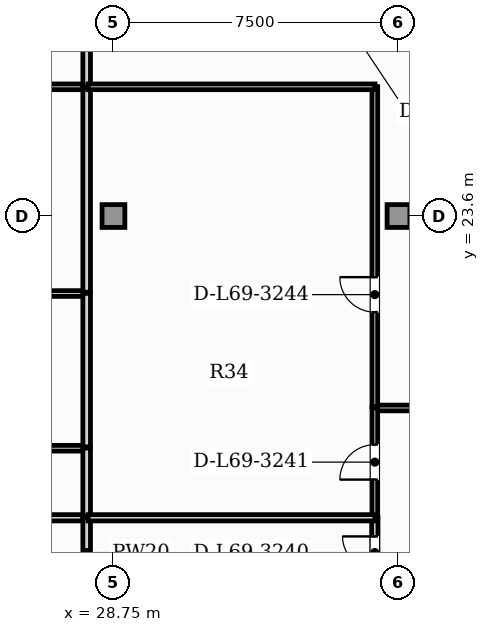
"""IFC4 building model, lengths in metres.
Left out: names, types, materials, properties, quantities, classifications, styles, units other than length and angle.
Written with IfcOpenShell. Run it as: python <this file> out.ifc"""

import sys

from ifc_helpers import new_model, si_unit, direction, frame, frame_2d, origin, origin_2d, place, context, subcontext, project, spatial, rectangle, extrude, element, fill, save


model = new_model("IFC4")
c1 = context("Model", 3, precision=1e-05, world=origin(), true_north=direction((0.0, 1.0)))
c2 = subcontext(c1, "Body", "Model", "MODEL_VIEW")
j1 = project(units=[si_unit("LENGTHUNIT", "METRE"), si_unit("PLANEANGLEUNIT", "RADIAN")], contexts=[c1])
p1 = place(None, origin())
s1 = spatial("IfcSite", under=j1, at=p1, CompositionType="ELEMENT")
p2 = place(p1, origin())
s2 = spatial("IfcBuilding", under=s1, at=p2, CompositionType="ELEMENT")
p3 = place(p2, frame((0.0, 0.0, 281.05)))
s3 = spatial("IfcBuildingStorey", under=s2, at=p3, CompositionType="ELEMENT", Elevation=281.05)
for number, where, z_axis, x_axis in (
    (1, (28.75, 23.6, 0.0), (0.0, 0.0, 1.0), (1.0, 0.0, 0.0)),
    (2, (36.25, 23.6, 0.0), (0.0, 0.0, 1.0), (1.0, 0.0, 0.0)),
):
    element("IfcColumn", number, at=place(p3, frame(where, z_axis=z_axis, x_axis=x_axis)), inside=s3, PredefinedType="COLUMN", context=c2, shape_type="SweptSolid", body=[
        extrude(rectangle(XDim=0.6, YDim=0.6, at=origin_2d()), origin(), (0.0, 0.0, 1.0), 3.85),
    ])
p4 = place(p3, frame((21.079, 27.0, 0.0), z_axis=(0.0, 0.0, 1.0), x_axis=(1.0, 0.0, 0.0)))
e3 = element("IfcWall", 3, at=p4, inside=s3, PredefinedType="PARTITIONING", context=c2, shape_type="SweptSolid", body=[
    extrude(rectangle(XDim=6.971, YDim=0.15, at=frame_2d((3.485, 0.0))), origin(), (0.0, 0.0, 1.0), 3.65),
])
p5 = place(p4, frame((3.025, 0.0, 0.0)))
e4 = element("IfcOpeningElement", 4, at=p5, cuts=e3, PredefinedType="OPENING", context=c2, shape_type="SweptSolid", body=[
    extrude(rectangle(XDim=0.92, YDim=2.1, at=frame_2d((0.46, 1.05))), frame((0.0, 0.085, 0.0), z_axis=(0.0, -1.0, 0.0), x_axis=(1.0, 0.0, 0.0)), (0.0, 0.0, 1.0), 0.17),
])
p6 = place(p3, frame((28.045, 26.995, 0.0), z_axis=(0.0, 0.0, 1.0), x_axis=(0.0, 1.0, 0.0)))
e5 = element("IfcWall", 5, at=p6, inside=s3, PredefinedType="PARTITIONING", context=c2, shape_type="SweptSolid", body=[
    extrude(rectangle(XDim=1.51, YDim=0.2, at=frame_2d((0.755, 0.0))), origin(), (0.0, 0.0, 1.0), 3.65),
])
p7 = place(p3, frame((21.079, 15.66, 0.0), z_axis=(0.0, 0.0, 1.0), x_axis=(1.0, 0.0, 0.0)))
e6 = element("IfcWall", 6, at=p7, inside=s3, PredefinedType="PLUMBINGWALL", context=c2, shape_type="SweptSolid", body=[
    extrude(rectangle(XDim=6.971, YDim=0.165, at=frame_2d((3.485, 0.0))), origin(), (0.0, 0.0, 1.0), 3.65),
])
p8 = place(p3, frame((28.045, 13.825, 0.0), z_axis=(0.0, 0.0, 1.0), x_axis=(0.0, 1.0, 0.0)))
e7 = element("IfcWall", 7, at=p8, inside=s3, PredefinedType="PARTITIONING", context=c2, shape_type="SweptSolid", body=[
    extrude(rectangle(XDim=1.84, YDim=0.2, at=frame_2d((0.92, 0.0))), origin(), (0.0, 0.0, 1.0), 3.65),
])
p9 = place(p3, frame((21.079, 17.49, 0.0), z_axis=(0.0, 0.0, 1.0), x_axis=(1.0, 0.0, 0.0)))
e8 = element("IfcWall", 8, at=p9, inside=s3, PredefinedType="PARTITIONING", context=c2, shape_type="SweptSolid", body=[
    extrude(rectangle(XDim=6.971, YDim=0.15, at=frame_2d((3.485, 0.0))), origin(), (0.0, 0.0, 1.0), 3.65),
])
p10 = place(p3, frame((28.045, 15.695, 0.0), z_axis=(0.0, 0.0, 1.0), x_axis=(0.0, 1.0, 0.0)))
e9 = element("IfcWall", 9, at=p10, inside=s3, PredefinedType="PARTITIONING", context=c2, shape_type="SweptSolid", body=[
    extrude(rectangle(XDim=1.8, YDim=0.2, at=frame_2d((0.9, 0.0))), origin(), (0.0, 0.0, 1.0), 3.65),
])
p11 = place(p3, frame((21.079, 21.561, 0.0), z_axis=(0.0, 0.0, 1.0), x_axis=(1.0, 0.0, 0.0)))
e10 = element("IfcWall", 10, at=p11, inside=s3, PredefinedType="PARTITIONING", context=c2, shape_type="SweptSolid", body=[
    extrude(rectangle(XDim=6.971, YDim=0.15, at=frame_2d((3.485, 0.0))), origin(), (0.0, 0.0, 1.0), 3.65),
])
p12 = place(p3, frame((28.045, 17.525, 0.0), z_axis=(0.0, 0.0, 1.0), x_axis=(0.0, 1.0, 0.0)))
e11 = element("IfcWall", 11, at=p12, inside=s3, PredefinedType="PARTITIONING", context=c2, shape_type="SweptSolid", body=[
    extrude(rectangle(XDim=4.041, YDim=0.2, at=frame_2d((2.021, 0.0))), origin(), (0.0, 0.0, 1.0), 3.65),
])
p13 = place(p3, frame((28.045, 21.596, 0.0), z_axis=(0.0, 0.0, 1.0), x_axis=(0.0, 1.0, 0.0)))
e12 = element("IfcWall", 12, at=p13, inside=s3, PredefinedType="PARTITIONING", context=c2, shape_type="SweptSolid", body=[
    extrude(rectangle(XDim=5.369, YDim=0.2, at=frame_2d((2.685, 0.0))), origin(), (0.0, 0.0, 1.0), 3.65),
])
p14 = place(p3, frame((35.622, 18.55, 0.0), z_axis=(0.0, 0.0, 1.0), x_axis=(1.0, 0.0, 0.0)))
e13 = element("IfcWall", 13, at=p14, inside=s3, PredefinedType="PARTITIONING", context=c2, shape_type="SweptSolid", body=[
    extrude(rectangle(XDim=4.99, YDim=0.15, at=frame_2d((2.495, 0.0))), origin(), (0.0, 0.0, 1.0), 3.65),
])
p15 = place(p14, frame((2.035, 0.0, 0.0)))
e14 = element("IfcOpeningElement", 14, at=p15, cuts=e13, PredefinedType="OPENING", context=c2, shape_type="SweptSolid", body=[
    extrude(rectangle(XDim=0.92, YDim=2.1, at=frame_2d((0.46, 1.05))), frame((0.0, 0.085, 0.0), z_axis=(0.0, -1.0, 0.0), x_axis=(1.0, 0.0, 0.0)), (0.0, 0.0, 1.0), 0.17),
])
p16 = place(p3, frame((35.627, 13.825, 0.0), z_axis=(0.0, 0.0, 1.0), x_axis=(0.0, 1.0, 0.0)))
e15 = element("IfcWall", 15, at=p16, inside=s3, PredefinedType="PLUMBINGWALL", context=c2, shape_type="SweptSolid", body=[
    extrude(rectangle(XDim=1.84, YDim=0.165, at=frame_2d((0.92, 0.0))), origin(), (0.0, 0.0, 1.0), 3.65),
])
p17 = place(p16, frame((0.495, 0.0, 0.0)))
e16 = element("IfcOpeningElement", 16, at=p17, cuts=e15, PredefinedType="OPENING", context=c2, shape_type="SweptSolid", body=[
    extrude(rectangle(XDim=0.85, YDim=2.1, at=frame_2d((0.425, 1.05))), frame((0.0, 0.093, 0.0), z_axis=(0.0, -1.0, 0.0), x_axis=(1.0, 0.0, 0.0)), (0.0, 0.0, 1.0), 0.185),
])
p18 = place(p3, frame((35.627, 15.695, 0.0), z_axis=(0.0, 0.0, 1.0), x_axis=(0.0, 1.0, 0.0)))
e17 = element("IfcWall", 17, at=p18, inside=s3, PredefinedType="PARTITIONING", context=c2, shape_type="SweptSolid", body=[
    extrude(rectangle(XDim=2.859, YDim=0.15, at=frame_2d((1.43, 0.0))), origin(), (0.0, 0.0, 1.0), 3.65),
])
p19 = place(p18, frame((0.97, 0.0, 0.0)))
e18 = element("IfcOpeningElement", 18, at=p19, cuts=e17, PredefinedType="OPENING", context=c2, shape_type="SweptSolid", body=[
    extrude(rectangle(XDim=0.92, YDim=2.1, at=frame_2d((0.46, 1.05))), frame((0.0, 0.085, 0.0), z_axis=(0.0, -1.0, 0.0), x_axis=(1.0, 0.0, 0.0)), (0.0, 0.0, 1.0), 0.17),
])
p20 = place(p3, frame((35.627, 18.584, 0.0), z_axis=(0.0, 0.0, 1.0), x_axis=(0.0, 1.0, 0.0)))
e19 = element("IfcWall", 19, at=p20, inside=s3, PredefinedType="PARTITIONING", context=c2, shape_type="SweptSolid", body=[
    extrude(rectangle(XDim=8.42, YDim=0.15, at=frame_2d((4.21, 0.0))), origin(), (0.0, 0.0, 1.0), 3.65),
])
p21 = place(p20, frame((2.487, 0.0, 0.0)))
e20 = element("IfcOpeningElement", 20, at=p21, cuts=e19, PredefinedType="OPENING", context=c2, shape_type="SweptSolid", body=[
    extrude(rectangle(XDim=0.92, YDim=2.1, at=frame_2d((0.46, 1.05))), frame((0.0, 0.085, 0.0), z_axis=(0.0, -1.0, 0.0), x_axis=(1.0, 0.0, 0.0)), (0.0, 0.0, 1.0), 0.17),
])
p22 = place(p3, frame((28.08, 27.0, 0.0), z_axis=(0.0, 0.0, 1.0), x_axis=(1.0, 0.0, 0.0)))
e21 = element("IfcWall", 21, at=p22, inside=s3, PredefinedType="PARTITIONING", context=c2, shape_type="SweptSolid", body=[
    extrude(rectangle(XDim=7.552, YDim=0.15, at=frame_2d((3.776, 0.0))), origin(), (0.0, 0.0, 1.0), 3.65),
])
p23 = place(p3, frame((28.08, 15.66, 0.0), z_axis=(0.0, 0.0, 1.0), x_axis=(1.0, 0.0, 0.0)))
e22 = element("IfcWall", 22, at=p23, inside=s3, PredefinedType="PLUMBINGWALL", context=c2, shape_type="SweptSolid", body=[
    extrude(rectangle(XDim=7.552, YDim=0.165, at=frame_2d((3.776, 0.0))), origin(), (0.0, 0.0, 1.0), 3.65),
])
p24 = place(p17, origin())
e23 = element("IfcDoor", 23, at=p24, inside=s3, OperationType="SINGLE_SWING_RIGHT", PredefinedType="DOOR", context=c2, shape_type="SweptSolid", body=[
    extrude(rectangle(XDim=0.85, YDim=2.1, at=frame_2d((0.425, 1.05))), frame((0.0, 0.025, 0.0), z_axis=(0.0, -1.0, 0.0), x_axis=(1.0, 0.0, 0.0)), (0.0, 0.0, 1.0), 0.05),
])
fill(e16, e23)
p25 = place(p19, origin())
e24 = element("IfcDoor", 24, at=p25, inside=s3, OperationType="SINGLE_SWING_LEFT", PredefinedType="DOOR", context=c2, shape_type="SweptSolid", body=[
    extrude(rectangle(XDim=0.92, YDim=2.1, at=frame_2d((0.46, 1.05))), frame((0.0, 0.025, 0.0), z_axis=(0.0, -1.0, 0.0), x_axis=(1.0, 0.0, 0.0)), (0.0, 0.0, 1.0), 0.05),
])
fill(e18, e24)
p26 = place(p21, origin())
e25 = element("IfcDoor", 25, at=p26, inside=s3, OperationType="SINGLE_SWING_RIGHT", PredefinedType="DOOR", context=c2, shape_type="SweptSolid", body=[
    extrude(rectangle(XDim=0.92, YDim=2.1, at=frame_2d((0.46, 1.05))), frame((0.0, 0.025, 0.0), z_axis=(0.0, -1.0, 0.0), x_axis=(1.0, 0.0, 0.0)), (0.0, 0.0, 1.0), 0.05),
])
fill(e20, e25)
save(model, sys.argv[1])
